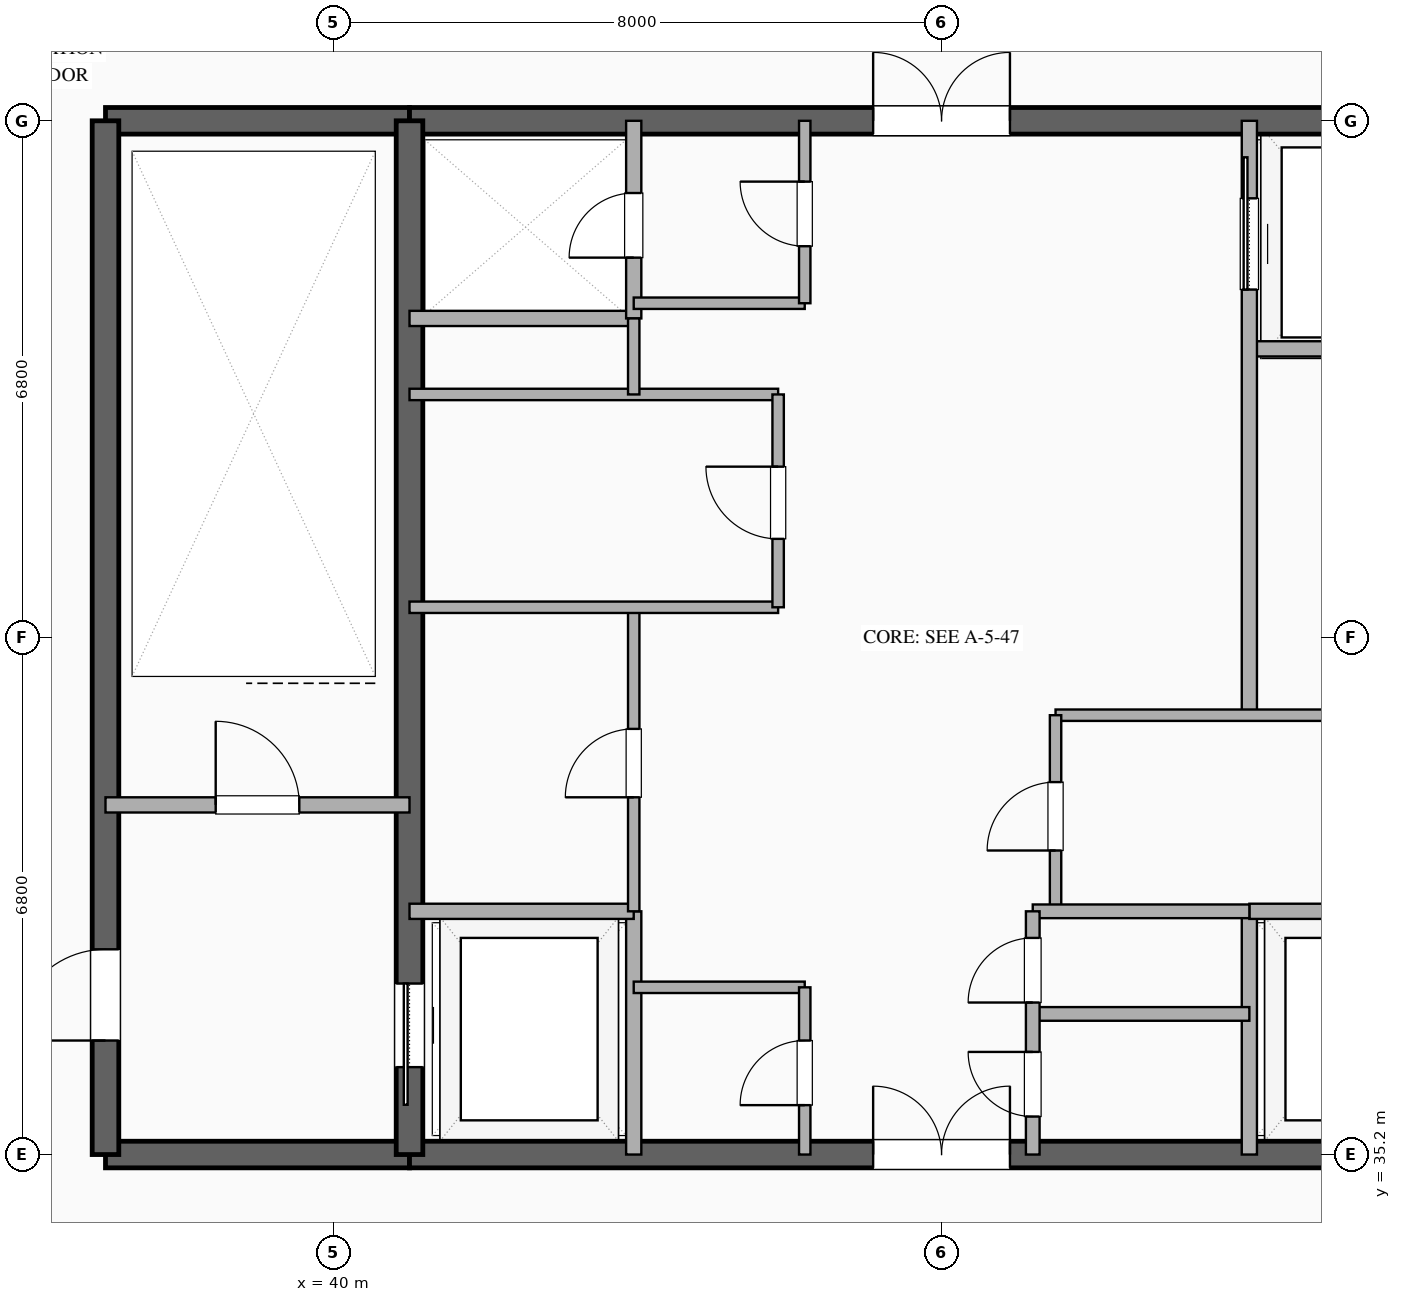
"""IFC4 building model, lengths in metres.
Left out: names, types, materials, properties, quantities, classifications, styles, units other than length and angle.
Written with IfcOpenShell. Run it as: python <this file> out.ifc"""

import sys

from ifc_helpers import new_model, si_unit, direction, frame, frame_2d, origin, place, context, subcontext, project, spatial, rectangle, extrude, element, fill, save


model = new_model("IFC4")
c1 = context("Model", 3, precision=1e-05, world=origin(), true_north=direction((0.0, 1.0)))
c2 = subcontext(c1, "Body", "Model", "MODEL_VIEW")
j1 = project(units=[si_unit("LENGTHUNIT", "METRE"), si_unit("PLANEANGLEUNIT", "RADIAN")], contexts=[c1])
p1 = place(None, origin())
s1 = spatial("IfcSite", under=j1, at=p1, CompositionType="ELEMENT")
p2 = place(p1, origin())
s2 = spatial("IfcBuilding", under=s1, at=p2, CompositionType="ELEMENT")
p3 = place(p2, frame((0.0, 0.0, 321.6)))
s3 = spatial("IfcBuildingStorey", under=s2, at=p3, CompositionType="ELEMENT", Elevation=321.6)
p4 = place(p3, frame((37.0, 35.2, 0.0), z_axis=(0.0, 0.0, 1.0), x_axis=(1.0, 0.0, 0.0)))
e1 = element("IfcWall", 1, at=p4, inside=s3, PredefinedType="SHEAR", context=c2, shape_type="SweptSolid", body=[
    extrude(rectangle(XDim=4.0, YDim=0.35, at=frame_2d((2.0, 0.0))), origin(), (0.0, 0.0, 1.0), 5.14),
])
p5 = place(p3, frame((41.0, 35.2, 0.0), z_axis=(0.0, 0.0, 1.0), x_axis=(1.0, 0.0, 0.0)))
e2 = element("IfcWall", 2, at=p5, inside=s3, PredefinedType="SHEAR", context=c2, shape_type="SweptSolid", body=[
    extrude(rectangle(XDim=14.0, YDim=0.35, at=frame_2d((7.0, 0.0))), origin(), (0.0, 0.0, 1.0), 5.14),
])
p6 = place(p5, frame((6.1, 0.0, 0.0)))
e3 = element("IfcOpeningElement", 3, at=p6, cuts=e2, PredefinedType="OPENING", context=c2, shape_type="SweptSolid", body=[
    extrude(rectangle(XDim=1.8, YDim=2.25, at=frame_2d((0.9, 1.125))), frame((0.0, 0.185, 0.0), z_axis=(0.0, -1.0, 0.0), x_axis=(1.0, 0.0, 0.0)), (0.0, 0.0, 1.0), 0.37),
])
p7 = place(p3, frame((37.0, 48.8, 0.0), z_axis=(0.0, 0.0, 1.0), x_axis=(1.0, 0.0, 0.0)))
e4 = element("IfcWall", 4, at=p7, inside=s3, PredefinedType="SHEAR", context=c2, shape_type="SweptSolid", body=[
    extrude(rectangle(XDim=4.0, YDim=0.35, at=frame_2d((2.0, 0.0))), origin(), (0.0, 0.0, 1.0), 5.14),
])
p8 = place(p3, frame((41.0, 48.8, 0.0), z_axis=(0.0, 0.0, 1.0), x_axis=(1.0, 0.0, 0.0)))
e5 = element("IfcWall", 5, at=p8, inside=s3, PredefinedType="SHEAR", context=c2, shape_type="SweptSolid", body=[
    extrude(rectangle(XDim=14.0, YDim=0.35, at=frame_2d((7.0, 0.0))), origin(), (0.0, 0.0, 1.0), 5.14),
])
p9 = place(p8, frame((6.1, 0.0, 0.0)))
e6 = element("IfcOpeningElement", 6, at=p9, cuts=e5, PredefinedType="OPENING", context=c2, shape_type="SweptSolid", body=[
    extrude(rectangle(XDim=1.8, YDim=2.25, at=frame_2d((0.9, 1.125))), frame((0.0, 0.185, 0.0), z_axis=(0.0, -1.0, 0.0), x_axis=(1.0, 0.0, 0.0)), (0.0, 0.0, 1.0), 0.37),
])
p10 = place(p3, frame((37.0, 35.2, 0.0), z_axis=(0.0, 0.0, 1.0), x_axis=(0.0, 1.0, 0.0)))
e7 = element("IfcWall", 7, at=p10, inside=s3, PredefinedType="SHEAR", context=c2, shape_type="SweptSolid", body=[
    extrude(rectangle(XDim=13.6, YDim=0.35, at=frame_2d((6.8, 0.0))), origin(), (0.0, 0.0, 1.0), 5.14),
])
p11 = place(p10, frame((1.5, 0.0, 0.0)))
e8 = element("IfcOpeningElement", 8, at=p11, cuts=e7, PredefinedType="OPENING", context=c2, shape_type="SweptSolid", body=[
    extrude(rectangle(XDim=1.2, YDim=2.15, at=frame_2d((0.6, 1.075))), frame((0.0, 0.185, 0.0), z_axis=(0.0, -1.0, 0.0), x_axis=(1.0, 0.0, 0.0)), (0.0, 0.0, 1.0), 0.37),
])
p12 = place(p3, frame((41.0, 35.2, 0.0), z_axis=(0.0, 0.0, 1.0), x_axis=(0.0, 1.0, 0.0)))
e9 = element("IfcWall", 9, at=p12, inside=s3, PredefinedType="SHEAR", context=c2, shape_type="SweptSolid", body=[
    extrude(rectangle(XDim=13.6, YDim=0.35, at=frame_2d((6.8, 0.0))), origin(), (0.0, 0.0, 1.0), 5.14),
])
p13 = place(p12, frame((1.15, 0.0, 0.0)))
e10 = element("IfcOpeningElement", 10, at=p13, cuts=e9, PredefinedType="OPENING", context=c2, shape_type="SweptSolid", body=[
    extrude(rectangle(XDim=1.1, YDim=2.2, at=frame_2d((0.55, 1.1))), frame((0.0, 0.185, 0.0), z_axis=(0.0, -1.0, 0.0), x_axis=(1.0, 0.0, 0.0)), (0.0, 0.0, 1.0), 0.37),
])
p14 = place(p3, frame((37.0, 39.8, 0.0), z_axis=(0.0, 0.0, 1.0), x_axis=(1.0, 0.0, 0.0)))
e11 = element("IfcWall", 11, at=p14, inside=s3, PredefinedType="SOLIDWALL", context=c2, shape_type="SweptSolid", body=[
    extrude(rectangle(XDim=4.0, YDim=0.2, at=frame_2d((2.0, 0.0))), origin(), (0.0, 0.0, 1.0), 3.74),
])
p15 = place(p14, frame((1.45, 0.0, 0.0)))
e12 = element("IfcOpeningElement", 12, at=p15, cuts=e11, PredefinedType="OPENING", context=c2, shape_type="SweptSolid", body=[
    extrude(rectangle(XDim=1.1, YDim=2.15, at=frame_2d((0.55, 1.075))), frame((0.0, 0.11, 0.0), z_axis=(0.0, -1.0, 0.0), x_axis=(1.0, 0.0, 0.0)), (0.0, 0.0, 1.0), 0.22),
])
p16 = place(p3, frame((43.95, 35.2, 0.0), z_axis=(0.0, 0.0, 1.0), x_axis=(0.0, 1.0, 0.0)))
e13 = element("IfcWall", 13, at=p16, inside=s3, PredefinedType="SOLIDWALL", context=c2, shape_type="SweptSolid", body=[
    extrude(rectangle(XDim=3.2, YDim=0.2, at=frame_2d((1.6, 0.0))), origin(), (0.0, 0.0, 1.0), 3.74),
])
p17 = place(p3, frame((41.0, 38.4, 0.0), z_axis=(0.0, 0.0, 1.0), x_axis=(1.0, 0.0, 0.0)))
e14 = element("IfcWall", 14, at=p17, inside=s3, PredefinedType="SOLIDWALL", context=c2, shape_type="SweptSolid", body=[
    extrude(rectangle(XDim=2.95, YDim=0.2, at=frame_2d((1.475, 0.0))), origin(), (0.0, 0.0, 1.0), 3.74),
])
p18 = place(p3, frame((52.05, 35.2, 0.0), z_axis=(0.0, 0.0, 1.0), x_axis=(0.0, 1.0, 0.0)))
e15 = element("IfcWall", 15, at=p18, inside=s3, PredefinedType="SOLIDWALL", context=c2, shape_type="SweptSolid", body=[
    extrude(rectangle(XDim=3.2, YDim=0.2, at=frame_2d((1.6, 0.0))), origin(), (0.0, 0.0, 1.0), 3.74),
])
for number, where, z_axis, x_axis in (
    (16, (52.05, 38.4, 0.0), (0.0, 0.0, 1.0), (1.0, 0.0, 0.0)),
    (17, (41.0, 46.2, 0.0), (0.0, 0.0, 1.0), (1.0, 0.0, 0.0)),
):
    element("IfcWall", number, at=place(p3, frame(where, z_axis=z_axis, x_axis=x_axis)), inside=s3, PredefinedType="SOLIDWALL", context=c2, shape_type="SweptSolid", body=[
        extrude(rectangle(XDim=2.95, YDim=0.2, at=frame_2d((1.475, 0.0))), origin(), (0.0, 0.0, 1.0), 3.74),
    ])
p19 = place(p3, frame((43.95, 46.2, 0.0), z_axis=(0.0, 0.0, 1.0), x_axis=(0.0, 1.0, 0.0)))
e18 = element("IfcWall", 18, at=p19, inside=s3, PredefinedType="SOLIDWALL", context=c2, shape_type="SweptSolid", body=[
    extrude(rectangle(XDim=2.6, YDim=0.2, at=frame_2d((1.3, 0.0))), origin(), (0.0, 0.0, 1.0), 3.74),
])
p20 = place(p19, frame((0.8, 0.0, 0.0)))
e19 = element("IfcOpeningElement", 19, at=p20, cuts=e18, PredefinedType="OPENING", context=c2, shape_type="SweptSolid", body=[
    extrude(rectangle(XDim=0.85, YDim=2.15, at=frame_2d((0.425, 1.075))), frame((0.0, 0.11, 0.0), z_axis=(0.0, -1.0, 0.0), x_axis=(1.0, 0.0, 0.0)), (0.0, 0.0, 1.0), 0.22),
])
p21 = place(p3, frame((43.95, 38.4, 0.0), z_axis=(0.0, 0.0, 1.0), x_axis=(0.0, 1.0, 0.0)))
e20 = element("IfcWall", 20, at=p21, inside=s3, PredefinedType="PARTITIONING", context=c2, shape_type="SweptSolid", body=[
    extrude(rectangle(XDim=4.0, YDim=0.15, at=frame_2d((2.0, 0.0))), origin(), (0.0, 0.0, 1.0), 3.74),
])
p22 = place(p21, frame((1.5, 0.0, 0.0)))
e21 = element("IfcOpeningElement", 21, at=p22, cuts=e20, PredefinedType="OPENING", context=c2, shape_type="SweptSolid", body=[
    extrude(rectangle(XDim=0.9, YDim=2.15, at=frame_2d((0.45, 1.075))), frame((0.0, 0.085, 0.0), z_axis=(0.0, -1.0, 0.0), x_axis=(1.0, 0.0, 0.0)), (0.0, 0.0, 1.0), 0.17),
])
for number, where, z_axis, x_axis in (
    (22, (41.0, 42.4, 0.0), (0.0, 0.0, 1.0), (1.0, 0.0, 0.0)),
    (23, (41.0, 45.2, 0.0), (0.0, 0.0, 1.0), (1.0, 0.0, 0.0)),
):
    element("IfcWall", number, at=place(p3, frame(where, z_axis=z_axis, x_axis=x_axis)), inside=s3, PredefinedType="PARTITIONING", context=c2, shape_type="SweptSolid", body=[
        extrude(rectangle(XDim=4.85, YDim=0.15, at=frame_2d((2.425, 0.0))), origin(), (0.0, 0.0, 1.0), 3.74),
    ])
p23 = place(p3, frame((43.95, 45.2, 0.0), z_axis=(0.0, 0.0, 1.0), x_axis=(0.0, 1.0, 0.0)))
e24 = element("IfcWall", 24, at=p23, inside=s3, PredefinedType="PARTITIONING", context=c2, shape_type="SweptSolid", body=[
    extrude(rectangle(XDim=1.0, YDim=0.15, at=frame_2d((0.5, 0.0))), origin(), (0.0, 0.0, 1.0), 3.74),
])
p24 = place(p3, frame((45.85, 42.4, 0.0), z_axis=(0.0, 0.0, 1.0), x_axis=(0.0, 1.0, 0.0)))
e25 = element("IfcWall", 25, at=p24, inside=s3, PredefinedType="PARTITIONING", context=c2, shape_type="SweptSolid", body=[
    extrude(rectangle(XDim=2.8, YDim=0.15, at=frame_2d((1.4, 0.0))), origin(), (0.0, 0.0, 1.0), 3.74),
])
p25 = place(p24, frame((0.9, 0.0, 0.0)))
e26 = element("IfcOpeningElement", 26, at=p25, cuts=e25, PredefinedType="OPENING", context=c2, shape_type="SweptSolid", body=[
    extrude(rectangle(XDim=0.95, YDim=2.15, at=frame_2d((0.475, 1.075))), frame((0.0, 0.085, 0.0), z_axis=(0.0, -1.0, 0.0), x_axis=(1.0, 0.0, 0.0)), (0.0, 0.0, 1.0), 0.17),
])
p26 = place(p3, frame((52.05, 45.8, 0.0), z_axis=(0.0, 0.0, 1.0), x_axis=(1.0, 0.0, 0.0)))
e27 = element("IfcWall", 27, at=p26, inside=s3, PredefinedType="SOLIDWALL", context=c2, shape_type="SweptSolid", body=[
    extrude(rectangle(XDim=2.95, YDim=0.2, at=frame_2d((1.475, 0.0))), origin(), (0.0, 0.0, 1.0), 3.74),
])
p27 = place(p3, frame((52.05, 40.98, 0.0), z_axis=(0.0, 0.0, 1.0), x_axis=(0.0, 1.0, 0.0)))
e28 = element("IfcWall", 28, at=p27, inside=s3, PredefinedType="SOLIDWALL", context=c2, shape_type="SweptSolid", body=[
    extrude(rectangle(XDim=7.82, YDim=0.2, at=frame_2d((3.91, 0.0))), origin(), (0.0, 0.0, 1.0), 3.74),
])
p28 = place(p27, frame((5.6, 0.0, 0.0)))
e29 = element("IfcOpeningElement", 29, at=p28, cuts=e28, PredefinedType="OPENING", context=c2, shape_type="SweptSolid", body=[
    extrude(rectangle(XDim=1.2, YDim=2.2, at=frame_2d((0.6, 1.1))), frame((0.0, 0.11, 0.0), z_axis=(0.0, -1.0, 0.0), x_axis=(1.0, 0.0, 0.0)), (0.0, 0.0, 1.0), 0.22),
])
p29 = place(p3, frame((49.5, 40.98, 0.0), z_axis=(0.0, 0.0, 1.0), x_axis=(1.0, 0.0, 0.0)))
e30 = element("IfcWall", 30, at=p29, inside=s3, PredefinedType="PARTITIONING", context=c2, shape_type="SweptSolid", body=[
    extrude(rectangle(XDim=5.5, YDim=0.15, at=frame_2d((2.75, 0.0))), origin(), (0.0, 0.0, 1.0), 3.74),
])
p30 = place(p3, frame((49.5, 38.4, 0.0), z_axis=(0.0, 0.0, 1.0), x_axis=(0.0, 1.0, 0.0)))
e31 = element("IfcWall", 31, at=p30, inside=s3, PredefinedType="PARTITIONING", context=c2, shape_type="SweptSolid", body=[
    extrude(rectangle(XDim=2.58, YDim=0.15, at=frame_2d((1.29, 0.0))), origin(), (0.0, 0.0, 1.0), 3.74),
])
p31 = place(p30, frame((0.8, 0.0, 0.0)))
e32 = element("IfcOpeningElement", 32, at=p31, cuts=e31, PredefinedType="OPENING", context=c2, shape_type="SweptSolid", body=[
    extrude(rectangle(XDim=0.9, YDim=2.15, at=frame_2d((0.45, 1.075))), frame((0.0, 0.085, 0.0), z_axis=(0.0, -1.0, 0.0), x_axis=(1.0, 0.0, 0.0)), (0.0, 0.0, 1.0), 0.17),
])
p32 = place(p3, frame((43.95, 37.4, 0.0), z_axis=(0.0, 0.0, 1.0), x_axis=(1.0, 0.0, 0.0)))
e33 = element("IfcWall", 33, at=p32, inside=s3, PredefinedType="PARTITIONING", context=c2, shape_type="SweptSolid", body=[
    extrude(rectangle(XDim=2.25, YDim=0.15, at=frame_2d((1.125, 0.0))), origin(), (0.0, 0.0, 1.0), 3.74),
])
p33 = place(p3, frame((46.2, 35.2, 0.0), z_axis=(0.0, 0.0, 1.0), x_axis=(0.0, 1.0, 0.0)))
e34 = element("IfcWall", 34, at=p33, inside=s3, PredefinedType="PARTITIONING", context=c2, shape_type="SweptSolid", body=[
    extrude(rectangle(XDim=2.2, YDim=0.15, at=frame_2d((1.1, 0.0))), origin(), (0.0, 0.0, 1.0), 3.74),
])
p34 = place(p33, frame((0.65, 0.0, 0.0)))
e35 = element("IfcOpeningElement", 35, at=p34, cuts=e34, PredefinedType="OPENING", context=c2, shape_type="SweptSolid", body=[
    extrude(rectangle(XDim=0.85, YDim=2.15, at=frame_2d((0.425, 1.075))), frame((0.0, 0.085, 0.0), z_axis=(0.0, -1.0, 0.0), x_axis=(1.0, 0.0, 0.0)), (0.0, 0.0, 1.0), 0.17),
])
p35 = place(p3, frame((43.95, 46.4, 0.0), z_axis=(0.0, 0.0, 1.0), x_axis=(1.0, 0.0, 0.0)))
e36 = element("IfcWall", 36, at=p35, inside=s3, PredefinedType="PARTITIONING", context=c2, shape_type="SweptSolid", body=[
    extrude(rectangle(XDim=2.25, YDim=0.15, at=frame_2d((1.125, 0.0))), origin(), (0.0, 0.0, 1.0), 3.74),
])
p36 = place(p3, frame((46.2, 46.4, 0.0), z_axis=(0.0, 0.0, 1.0), x_axis=(0.0, 1.0, 0.0)))
e37 = element("IfcWall", 37, at=p36, inside=s3, PredefinedType="PARTITIONING", context=c2, shape_type="SweptSolid", body=[
    extrude(rectangle(XDim=2.4, YDim=0.15, at=frame_2d((1.2, 0.0))), origin(), (0.0, 0.0, 1.0), 3.74),
])
p37 = place(p36, frame((0.75, 0.0, 0.0)))
e38 = element("IfcOpeningElement", 38, at=p37, cuts=e37, PredefinedType="OPENING", context=c2, shape_type="SweptSolid", body=[
    extrude(rectangle(XDim=0.85, YDim=2.15, at=frame_2d((0.425, 1.075))), frame((0.0, 0.085, 0.0), z_axis=(0.0, -1.0, 0.0), x_axis=(1.0, 0.0, 0.0)), (0.0, 0.0, 1.0), 0.17),
])
for number, where, z_axis, x_axis in (
    (39, (49.2, 37.05, 0.0), (0.0, 0.0, 1.0), (1.0, 0.0, 0.0)),
    (40, (49.2, 38.4, 0.0), (0.0, 0.0, 1.0), (1.0, 0.0, 0.0)),
):
    element("IfcWall", number, at=place(p3, frame(where, z_axis=z_axis, x_axis=x_axis)), inside=s3, PredefinedType="PLUMBINGWALL", context=c2, shape_type="SweptSolid", body=[
        extrude(rectangle(XDim=2.85, YDim=0.18, at=frame_2d((1.425, 0.0))), origin(), (0.0, 0.0, 1.0), 3.74),
    ])
p38 = place(p3, frame((49.2, 35.2, 0.0), z_axis=(0.0, 0.0, 1.0), x_axis=(0.0, 1.0, 0.0)))
e41 = element("IfcWall", 41, at=p38, inside=s3, PredefinedType="PLUMBINGWALL", context=c2, shape_type="SweptSolid", body=[
    extrude(rectangle(XDim=3.2, YDim=0.18, at=frame_2d((1.6, 0.0))), origin(), (0.0, 0.0, 1.0), 3.74),
])
p39 = place(p38, frame((0.5, 0.0, 0.0)))
e42 = element("IfcOpeningElement", 42, at=p39, cuts=e41, PredefinedType="OPENING", context=c2, shape_type="SweptSolid", body=[
    extrude(rectangle(XDim=0.85, YDim=2.1, at=frame_2d((0.425, 1.05))), frame((0.0, 0.1, 0.0), z_axis=(0.0, -1.0, 0.0), x_axis=(1.0, 0.0, 0.0)), (0.0, 0.0, 1.0), 0.2),
])
p40 = place(p38, frame((2.0, 0.0, 0.0)))
e43 = element("IfcOpeningElement", 43, at=p40, cuts=e41, PredefinedType="OPENING", context=c2, shape_type="SweptSolid", body=[
    extrude(rectangle(XDim=0.85, YDim=2.15, at=frame_2d((0.425, 1.075))), frame((0.0, 0.1, 0.0), z_axis=(0.0, -1.0, 0.0), x_axis=(1.0, 0.0, 0.0)), (0.0, 0.0, 1.0), 0.2),
])
p41 = place(p13, origin())
e44 = element("IfcDoor", 44, at=p41, inside=s3, OperationType="SLIDING_TO_LEFT", PredefinedType="DOOR", context=c2, shape_type="SweptSolid", body=[
    extrude(rectangle(XDim=1.1, YDim=2.2, at=frame_2d((0.55, 1.1))), frame((0.0, 0.025, 0.0), z_axis=(0.0, -1.0, 0.0), x_axis=(1.0, 0.0, 0.0)), (0.0, 0.0, 1.0), 0.05),
])
fill(e10, e44)
p42 = place(p11, origin())
e45 = element("IfcDoor", 45, at=p42, inside=s3, OperationType="SINGLE_SWING_LEFT", PredefinedType="DOOR", context=c2, shape_type="SweptSolid", body=[
    extrude(rectangle(XDim=1.2, YDim=2.15, at=frame_2d((0.6, 1.075))), frame((0.0, 0.025, 0.0), z_axis=(0.0, -1.0, 0.0), x_axis=(1.0, 0.0, 0.0)), (0.0, 0.0, 1.0), 0.05),
])
fill(e8, e45)
p43 = place(p6, origin())
e46 = element("IfcDoor", 46, at=p43, inside=s3, OperationType="DOUBLE_DOOR_SINGLE_SWING", PredefinedType="DOOR", context=c2, shape_type="SweptSolid", body=[
    extrude(rectangle(XDim=1.8, YDim=2.25, at=frame_2d((0.9, 1.125))), frame((0.0, 0.025, 0.0), z_axis=(0.0, -1.0, 0.0), x_axis=(1.0, 0.0, 0.0)), (0.0, 0.0, 1.0), 0.05),
])
fill(e3, e46)
p44 = place(p9, origin())
e47 = element("IfcDoor", 47, at=p44, inside=s3, OperationType="DOUBLE_DOOR_SINGLE_SWING", PredefinedType="DOOR", context=c2, shape_type="SweptSolid", body=[
    extrude(rectangle(XDim=1.8, YDim=2.25, at=frame_2d((0.9, 1.125))), frame((0.0, 0.025, 0.0), z_axis=(0.0, -1.0, 0.0), x_axis=(1.0, 0.0, 0.0)), (0.0, 0.0, 1.0), 0.05),
])
fill(e6, e47)
p45 = place(p15, origin())
e48 = element("IfcDoor", 48, at=p45, inside=s3, OperationType="SINGLE_SWING_LEFT", PredefinedType="DOOR", context=c2, shape_type="SweptSolid", body=[
    extrude(rectangle(XDim=1.1, YDim=2.15, at=frame_2d((0.55, 1.075))), frame((0.0, 0.025, 0.0), z_axis=(0.0, -1.0, 0.0), x_axis=(1.0, 0.0, 0.0)), (0.0, 0.0, 1.0), 0.05),
])
fill(e12, e48)
p46 = place(p20, origin())
e49 = element("IfcDoor", 49, at=p46, inside=s3, OperationType="SINGLE_SWING_LEFT", PredefinedType="DOOR", context=c2, shape_type="SweptSolid", body=[
    extrude(rectangle(XDim=0.85, YDim=2.15, at=frame_2d((0.425, 1.075))), frame((0.0, 0.025, 0.0), z_axis=(0.0, -1.0, 0.0), x_axis=(1.0, 0.0, 0.0)), (0.0, 0.0, 1.0), 0.05),
])
fill(e19, e49)
p47 = place(p22, origin())
e50 = element("IfcDoor", 50, at=p47, inside=s3, OperationType="SINGLE_SWING_LEFT", PredefinedType="DOOR", context=c2, shape_type="SweptSolid", body=[
    extrude(rectangle(XDim=0.9, YDim=2.15, at=frame_2d((0.45, 1.075))), frame((0.0, 0.025, 0.0), z_axis=(0.0, -1.0, 0.0), x_axis=(1.0, 0.0, 0.0)), (0.0, 0.0, 1.0), 0.05),
])
fill(e21, e50)
p48 = place(p25, origin())
e51 = element("IfcDoor", 51, at=p48, inside=s3, OperationType="SINGLE_SWING_RIGHT", PredefinedType="DOOR", context=c2, shape_type="SweptSolid", body=[
    extrude(rectangle(XDim=0.95, YDim=2.15, at=frame_2d((0.475, 1.075))), frame((0.0, 0.025, 0.0), z_axis=(0.0, -1.0, 0.0), x_axis=(1.0, 0.0, 0.0)), (0.0, 0.0, 1.0), 0.05),
])
fill(e26, e51)
p49 = place(p28, origin())
e52 = element("IfcDoor", 52, at=p49, inside=s3, OperationType="SLIDING_TO_RIGHT", PredefinedType="DOOR", context=c2, shape_type="SweptSolid", body=[
    extrude(rectangle(XDim=1.2, YDim=2.2, at=frame_2d((0.6, 1.1))), frame((0.0, 0.025, 0.0), z_axis=(0.0, -1.0, 0.0), x_axis=(1.0, 0.0, 0.0)), (0.0, 0.0, 1.0), 0.05),
])
fill(e29, e52)
p50 = place(p31, origin())
e53 = element("IfcDoor", 53, at=p50, inside=s3, OperationType="SINGLE_SWING_LEFT", PredefinedType="DOOR", context=c2, shape_type="SweptSolid", body=[
    extrude(rectangle(XDim=0.9, YDim=2.15, at=frame_2d((0.45, 1.075))), frame((0.0, 0.025, 0.0), z_axis=(0.0, -1.0, 0.0), x_axis=(1.0, 0.0, 0.0)), (0.0, 0.0, 1.0), 0.05),
])
fill(e32, e53)
p51 = place(p34, origin())
e54 = element("IfcDoor", 54, at=p51, inside=s3, OperationType="SINGLE_SWING_LEFT", PredefinedType="DOOR", context=c2, shape_type="SweptSolid", body=[
    extrude(rectangle(XDim=0.85, YDim=2.15, at=frame_2d((0.425, 1.075))), frame((0.0, 0.025, 0.0), z_axis=(0.0, -1.0, 0.0), x_axis=(1.0, 0.0, 0.0)), (0.0, 0.0, 1.0), 0.05),
])
fill(e35, e54)
p52 = place(p37, origin())
e55 = element("IfcDoor", 55, at=p52, inside=s3, OperationType="SINGLE_SWING_RIGHT", PredefinedType="DOOR", context=c2, shape_type="SweptSolid", body=[
    extrude(rectangle(XDim=0.85, YDim=2.15, at=frame_2d((0.425, 1.075))), frame((0.0, 0.025, 0.0), z_axis=(0.0, -1.0, 0.0), x_axis=(1.0, 0.0, 0.0)), (0.0, 0.0, 1.0), 0.05),
])
fill(e38, e55)
p53 = place(p39, origin())
e56 = element("IfcDoor", 56, at=p53, inside=s3, OperationType="SINGLE_SWING_RIGHT", PredefinedType="DOOR", context=c2, shape_type="SweptSolid", body=[
    extrude(rectangle(XDim=0.85, YDim=2.1, at=frame_2d((0.425, 1.05))), frame((0.0, 0.025, 0.0), z_axis=(0.0, -1.0, 0.0), x_axis=(1.0, 0.0, 0.0)), (0.0, 0.0, 1.0), 0.05),
])
fill(e42, e56)
p54 = place(p40, origin())
e57 = element("IfcDoor", 57, at=p54, inside=s3, OperationType="SINGLE_SWING_LEFT", PredefinedType="DOOR", context=c2, shape_type="SweptSolid", body=[
    extrude(rectangle(XDim=0.85, YDim=2.15, at=frame_2d((0.425, 1.075))), frame((0.0, 0.025, 0.0), z_axis=(0.0, -1.0, 0.0), x_axis=(1.0, 0.0, 0.0)), (0.0, 0.0, 1.0), 0.05),
])
fill(e43, e57)
save(model, sys.argv[1])
